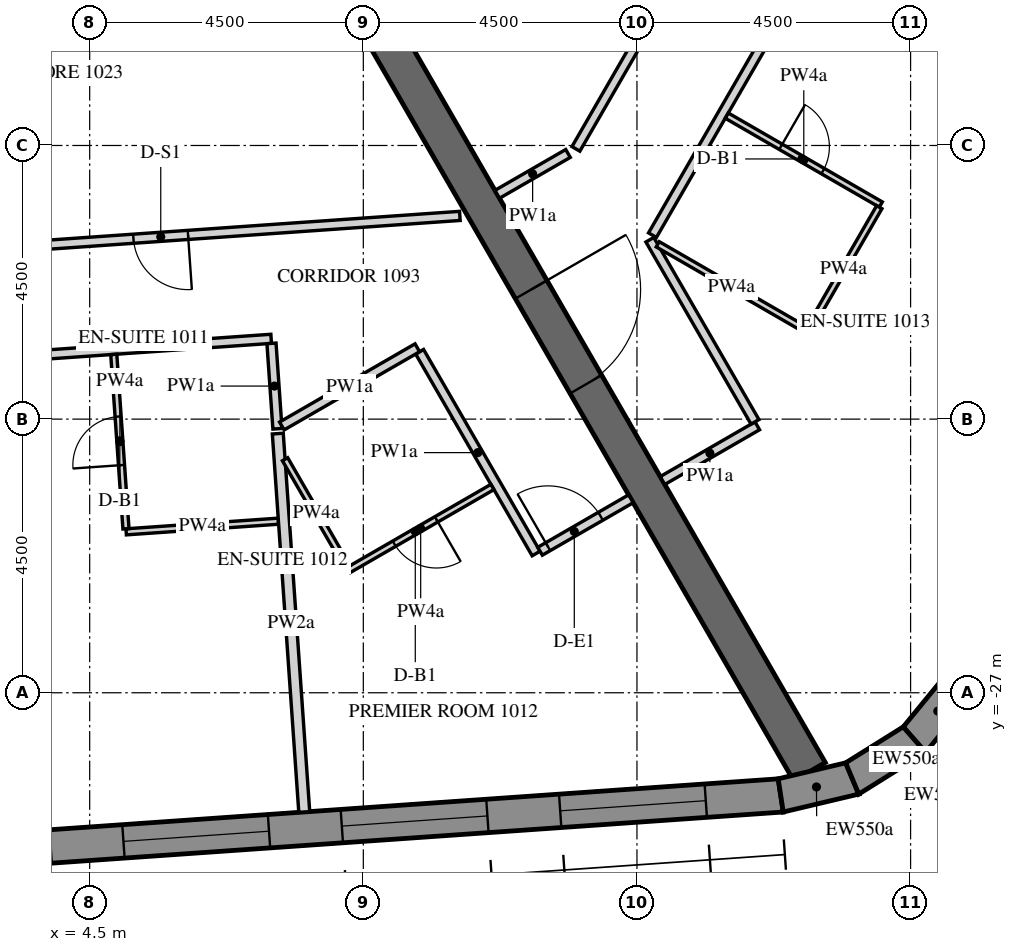
"""IFC4 building model, lengths in metres.
Left out: names, types, materials, properties, quantities, classifications, styles, units other than length and angle.
Written with IfcOpenShell. Run it as: python <this file> out.ifc"""

import sys

from ifc_helpers import new_model, si_unit, direction, frame, frame_2d, origin, place, context, subcontext, project, spatial, polyline, rectangle, outline, extrude, element, fill, save


model = new_model("IFC4")
c1 = context("Model", 3, precision=1e-05, world=origin(), true_north=direction((0.0, 1.0)))
c2 = subcontext(c1, "Body", "Model", "MODEL_VIEW")
j1 = project(units=[si_unit("LENGTHUNIT", "METRE"), si_unit("PLANEANGLEUNIT", "RADIAN")], contexts=[c1])
p1 = place(None, origin())
s1 = spatial("IfcSite", under=j1, at=p1, CompositionType="ELEMENT")
p2 = place(p1, origin())
s2 = spatial("IfcBuilding", under=s1, at=p2, CompositionType="ELEMENT")
p3 = place(p2, frame((0.0, 0.0, 142.8)))
s3 = spatial("IfcBuildingStorey", under=s2, at=p3, CompositionType="ELEMENT", Elevation=142.8)
p4 = place(p3, frame((-14.134, -30.786, -0.15), z_axis=(0.0, 0.0, 1.0), x_axis=(0.997564037441, 0.069756657061, 0.0)))
e1 = element("IfcWall", 1, at=p4, inside=s3, PredefinedType="SOLIDWALL", context=c2, shape_type="SweptSolid", body=[
    extrude(outline(polyline([(-0.026, -0.275), (30.094, -0.275), (30.049, 0.275), (0.026, 0.275), (-0.026, -0.275)])), origin(), (0.0, 0.0, 1.0), 3.75),
])
p5 = place(p4, frame((1.236, 0.0, 1.05)))
e2 = element("IfcOpeningElement", 2, at=p5, cuts=e1, PredefinedType="OPENING", context=c2, shape_type="SweptSolid", body=[
    extrude(rectangle(XDim=2.4, YDim=2.4, at=frame_2d((1.2, 1.2))), frame((0.0, 0.285, 0.0), z_axis=(0.0, -1.0, 0.0), x_axis=(1.0, 0.0, 0.0)), (0.0, 0.0, 1.0), 0.57),
])
p6 = place(p4, frame((4.835, 0.0, 1.05)))
e3 = element("IfcOpeningElement", 3, at=p6, cuts=e1, PredefinedType="OPENING", context=c2, shape_type="SweptSolid", body=[
    extrude(rectangle(XDim=2.4, YDim=2.4, at=frame_2d((1.2, 1.2))), frame((0.0, 0.285, 0.0), z_axis=(0.0, -1.0, 0.0), x_axis=(1.0, 0.0, 0.0)), (0.0, 0.0, 1.0), 0.57),
])
p7 = place(p4, frame((8.436, 0.0, 1.05)))
e4 = element("IfcOpeningElement", 4, at=p7, cuts=e1, PredefinedType="OPENING", context=c2, shape_type="SweptSolid", body=[
    extrude(rectangle(XDim=2.4, YDim=2.4, at=frame_2d((1.2, 1.2))), frame((0.0, 0.285, 0.0), z_axis=(0.0, -1.0, 0.0), x_axis=(1.0, 0.0, 0.0)), (0.0, 0.0, 1.0), 0.57),
])
p8 = place(p4, frame((12.035, 0.0, 1.05)))
e5 = element("IfcOpeningElement", 5, at=p8, cuts=e1, PredefinedType="OPENING", context=c2, shape_type="SweptSolid", body=[
    extrude(rectangle(XDim=2.4, YDim=2.4, at=frame_2d((1.2, 1.2))), frame((0.0, 0.285, 0.0), z_axis=(0.0, -1.0, 0.0), x_axis=(1.0, 0.0, 0.0)), (0.0, 0.0, 1.0), 0.57),
])
p9 = place(p4, frame((15.635, 0.0, 1.05)))
e6 = element("IfcOpeningElement", 6, at=p9, cuts=e1, PredefinedType="OPENING", context=c2, shape_type="SweptSolid", body=[
    extrude(rectangle(XDim=2.4, YDim=2.4, at=frame_2d((1.2, 1.2))), frame((0.0, 0.285, 0.0), z_axis=(0.0, -1.0, 0.0), x_axis=(1.0, 0.0, 0.0)), (0.0, 0.0, 1.0), 0.57),
])
p10 = place(p4, frame((19.236, 0.0, 1.05)))
e7 = element("IfcOpeningElement", 7, at=p10, cuts=e1, PredefinedType="OPENING", context=c2, shape_type="SweptSolid", body=[
    extrude(rectangle(XDim=2.4, YDim=2.4, at=frame_2d((1.2, 1.2))), frame((0.0, 0.285, 0.0), z_axis=(0.0, -1.0, 0.0), x_axis=(1.0, 0.0, 0.0)), (0.0, 0.0, 1.0), 0.57),
])
p11 = place(p4, frame((22.835, 0.0, 1.05)))
e8 = element("IfcOpeningElement", 8, at=p11, cuts=e1, PredefinedType="OPENING", context=c2, shape_type="SweptSolid", body=[
    extrude(rectangle(XDim=2.4, YDim=2.4, at=frame_2d((1.2, 1.2))), frame((0.0, 0.285, 0.0), z_axis=(0.0, -1.0, 0.0), x_axis=(1.0, 0.0, 0.0)), (0.0, 0.0, 1.0), 0.57),
])
p12 = place(p4, frame((26.436, 0.0, 1.05)))
e9 = element("IfcOpeningElement", 9, at=p12, cuts=e1, PredefinedType="OPENING", context=c2, shape_type="SweptSolid", body=[
    extrude(rectangle(XDim=2.4, YDim=2.4, at=frame_2d((1.2, 1.2))), frame((0.0, 0.285, 0.0), z_axis=(0.0, -1.0, 0.0), x_axis=(1.0, 0.0, 0.0)), (0.0, 0.0, 1.0), 0.57),
])
p13 = place(p3, frame((15.864, -28.688, -0.15), z_axis=(0.0, 0.0, 1.0), x_axis=(0.973063591128, 0.230536868247, 0.0)))
e10 = element("IfcWall", 10, at=p13, inside=s3, PredefinedType="SOLIDWALL", context=c2, shape_type="SweptSolid", body=[
    extrude(outline(polyline([(-0.022, -0.275), (1.253, -0.275), (1.163, 0.275), (0.022, 0.275), (-0.022, -0.275)])), origin(), (0.0, 0.0, 1.0), 3.75),
])
p14 = place(p3, frame((17.04, -28.41, -0.15), z_axis=(0.0, 0.0, 1.0), x_axis=(0.847952888306, 0.530071598195, 0.0)))
e11 = element("IfcWall", 11, at=p14, inside=s3, PredefinedType="SOLIDWALL", context=c2, shape_type="SweptSolid", body=[
    extrude(outline(polyline([(-0.045, -0.275), (1.253, -0.275), (1.163, 0.275), (0.045, 0.275), (-0.045, -0.275)])), origin(), (0.0, 0.0, 1.0), 3.75),
])
p15 = place(p3, frame((18.064, -27.769, -0.15), z_axis=(0.0, 0.0, 1.0), x_axis=(0.633842757806, 0.773461930787, 0.0)))
e12 = element("IfcWall", 12, at=p15, inside=s3, PredefinedType="SOLIDWALL", context=c2, shape_type="SweptSolid", body=[
    extrude(outline(polyline([(-0.045, -0.275), (1.231, -0.275), (1.186, 0.275), (0.045, 0.275), (-0.045, -0.275)])), origin(), (0.0, 0.0, 1.0), 3.75),
])
p16 = place(p3, frame((8.083, -14.0, -0.15), z_axis=(0.0, 0.0, 1.0), x_axis=(0.499997680643, -0.866026742862, 0.0)))
e13 = element("IfcWall", 13, at=p16, inside=s3, PredefinedType="SHEAR", context=c2, shape_type="SweptSolid", body=[
    extrude(rectangle(XDim=16.509, YDim=0.6, at=frame_2d((8.254, 0.0))), origin(), (0.0, 0.0, 1.0), 3.75),
])
p17 = place(p16, frame((7.354, 0.0, 0.15)))
e14 = element("IfcOpeningElement", 14, at=p17, cuts=e13, PredefinedType="OPENING", context=c2, shape_type="SweptSolid", body=[
    extrude(rectangle(XDim=1.8, YDim=2.4, at=frame_2d((0.9, 1.2))), frame((0.0, 0.31, 0.0), z_axis=(0.0, -1.0, 0.0), x_axis=(1.0, 0.0, 0.0)), (0.0, 0.0, 1.0), 0.62),
])
p18 = place(p3, frame((-11.902, -22.535, 0.0), z_axis=(0.0, 0.0, 1.0), x_axis=(0.997563830208, 0.069759620556, 0.0)))
e15 = element("IfcWall", 15, at=p18, inside=s3, PredefinedType="PARTITIONING", context=c2, shape_type="SweptSolid", body=[
    extrude(rectangle(XDim=19.434, YDim=0.15, at=frame_2d((9.717, 0.0))), origin(), (0.0, 0.0, 1.0), 2.838),
])
p19 = place(p18, frame((2.575, 0.0, 0.0)))
e16 = element("IfcOpeningElement", 16, at=p19, cuts=e15, PredefinedType="OPENING", context=c2, shape_type="SweptSolid", body=[
    extrude(rectangle(XDim=1.0, YDim=2.1, at=frame_2d((0.5, 1.05))), frame((0.0, 0.085, 0.0), z_axis=(0.0, -1.0, 0.0), x_axis=(1.0, 0.0, 0.0)), (0.0, 0.0, 1.0), 0.17),
])
p20 = place(p18, frame((12.234, 0.0, 0.0)))
e17 = element("IfcOpeningElement", 17, at=p20, cuts=e15, PredefinedType="OPENING", context=c2, shape_type="SweptSolid", body=[
    extrude(rectangle(XDim=1.0, YDim=2.1, at=frame_2d((0.5, 1.05))), frame((0.0, 0.085, 0.0), z_axis=(0.0, -1.0, 0.0), x_axis=(1.0, 0.0, 0.0)), (0.0, 0.0, 1.0), 0.17),
])
p21 = place(p3, frame((7.49, -21.254, 0.0), z_axis=(0.0, 0.0, 1.0), x_axis=(0.069718673592, -0.997566692784, 0.0)))
e18 = element("IfcWall", 18, at=p21, inside=s3, PredefinedType="PARTITIONING", context=c2, shape_type="SweptSolid", body=[
    extrude(rectangle(XDim=1.408, YDim=0.15, at=frame_2d((0.704, 0.0))), origin(), (0.0, 0.0, 1.0), 2.838),
])
p22 = place(p3, frame((9.926, -21.392, 0.0), z_axis=(0.0, 0.0, 1.0), x_axis=(0.500031306162, -0.866007328409, 0.0)))
e19 = element("IfcWall", 19, at=p22, inside=s3, PredefinedType="PARTITIONING", context=c2, shape_type="SweptSolid", body=[
    extrude(rectangle(XDim=3.832, YDim=0.15, at=frame_2d((1.916, 0.0))), origin(), (0.0, 0.0, 1.0), 2.838),
])
p23 = place(p3, frame((11.906, -24.673, 0.0), z_axis=(0.0, 0.0, 1.0), x_axis=(0.866013532718, 0.500020560727, 0.0)))
e20 = element("IfcWall", 20, at=p23, inside=s3, PredefinedType="PARTITIONING", context=c2, shape_type="SweptSolid", body=[
    extrude(rectangle(XDim=1.725, YDim=0.15, at=frame_2d((0.863, 0.0))), origin(), (0.0, 0.0, 1.0), 2.838),
])
p24 = place(p23, frame((0.15, 0.0, 0.0)))
e21 = element("IfcOpeningElement", 21, at=p24, cuts=e20, PredefinedType="OPENING", context=c2, shape_type="SweptSolid", body=[
    extrude(rectangle(XDim=1.0, YDim=2.1, at=frame_2d((0.5, 1.05))), frame((0.0, 0.085, 0.0), z_axis=(0.0, -1.0, 0.0), x_axis=(1.0, 0.0, 0.0)), (0.0, 0.0, 1.0), 0.17),
])
p25 = place(p3, frame((7.66, -22.613, 0.0), z_axis=(0.0, 0.0, 1.0), x_axis=(0.866003870164, 0.500037295471, 0.0)))
e22 = element("IfcWall", 22, at=p25, inside=s3, PredefinedType="PARTITIONING", context=c2, shape_type="SweptSolid", body=[
    extrude(rectangle(XDim=2.573, YDim=0.15, at=frame_2d((1.287, 0.0))), origin(), (0.0, 0.0, 1.0), 2.838),
])
p26 = place(p3, frame((10.587, -19.158, 0.0), z_axis=(0.0, 0.0, 1.0), x_axis=(-0.997565137136, -0.069740928955, 0.0)))
e23 = element("IfcWall", 23, at=p26, inside=s3, PredefinedType="PARTITIONING", context=c2, shape_type="SweptSolid", body=[
    extrude(rectangle(XDim=9.861, YDim=0.15, at=frame_2d((4.931, 0.0))), origin(), (0.0, 0.0, 1.0), 2.838),
])
p27 = place(p26, frame((4.481, 0.0, 0.0)))
e24 = element("IfcOpeningElement", 24, at=p27, cuts=e23, PredefinedType="OPENING", context=c2, shape_type="SweptSolid", body=[
    extrude(rectangle(XDim=0.9, YDim=2.1, at=frame_2d((0.45, 1.05))), frame((0.0, 0.085, 0.0), z_axis=(0.0, -1.0, 0.0), x_axis=(1.0, 0.0, 0.0)), (0.0, 0.0, 1.0), 0.17),
])
p28 = place(p3, frame((13.92, -23.51, 0.0), z_axis=(0.0, 0.0, 1.0), x_axis=(0.866047807691, 0.499961193289, 0.0)))
e25 = element("IfcWall", 25, at=p28, inside=s3, PredefinedType="PARTITIONING", context=c2, shape_type="SweptSolid", body=[
    extrude(rectangle(XDim=1.8, YDim=0.15, at=frame_2d((0.9, 0.0))), origin(), (0.0, 0.0, 1.0), 2.838),
])
p29 = place(p3, frame((15.441, -22.545, 0.0), z_axis=(0.0, 0.0, 1.0), x_axis=(-0.500003541824, 0.866023358902, 0.0)))
e26 = element("IfcWall", 26, at=p29, inside=s3, PredefinedType="PARTITIONING", context=c2, shape_type="SweptSolid", body=[
    extrude(rectangle(XDim=3.458, YDim=0.15, at=frame_2d((1.729, 0.0))), origin(), (0.0, 0.0, 1.0), 2.838),
])
p30 = place(p3, frame((13.755, -19.475, 0.0), z_axis=(0.0, 0.0, 1.0), x_axis=(0.50000013933, 0.866025323342, 0.0)))
e27 = element("IfcWall", 27, at=p30, inside=s3, PredefinedType="PARTITIONING", context=c2, shape_type="SweptSolid", body=[
    extrude(rectangle(XDim=23.517, YDim=0.15, at=frame_2d((11.758, 0.0))), origin(), (0.0, 0.0, 1.0), 2.838),
])
p31 = place(p30, frame((4.456, 0.0, 0.0)))
e28 = element("IfcOpeningElement", 28, at=p31, cuts=e27, PredefinedType="OPENING", context=c2, shape_type="SweptSolid", body=[
    extrude(rectangle(XDim=1.0, YDim=2.1, at=frame_2d((0.5, 1.05))), frame((0.0, 0.085, 0.0), z_axis=(0.0, -1.0, 0.0), x_axis=(1.0, 0.0, 0.0)), (0.0, 0.0, 1.0), 0.17),
])
p32 = place(p30, frame((13.699, 0.0, 0.0)))
e29 = element("IfcOpeningElement", 29, at=p32, cuts=e27, PredefinedType="OPENING", context=c2, shape_type="SweptSolid", body=[
    extrude(rectangle(XDim=1.0, YDim=2.1, at=frame_2d((0.5, 1.05))), frame((0.0, 0.085, 0.0), z_axis=(0.0, -1.0, 0.0), x_axis=(1.0, 0.0, 0.0)), (0.0, 0.0, 1.0), 0.17),
])
p33 = place(p30, frame((21.658, 0.0, 0.0)))
e30 = element("IfcOpeningElement", 30, at=p33, cuts=e27, PredefinedType="OPENING", context=c2, shape_type="SweptSolid", body=[
    extrude(rectangle(XDim=1.0, YDim=2.1, at=frame_2d((0.5, 1.05))), frame((0.0, 0.085, 0.0), z_axis=(0.0, -1.0, 0.0), x_axis=(1.0, 0.0, 0.0)), (0.0, 0.0, 1.0), 0.17),
])
p34 = place(p3, frame((16.643, -10.874, 0.0), z_axis=(0.0, 0.0, 1.0), x_axis=(-0.50000192383, -0.866024293058, 0.0)))
e31 = element("IfcWall", 31, at=p34, inside=s3, PredefinedType="PARTITIONING", context=c2, shape_type="SweptSolid", body=[
    extrude(rectangle(XDim=8.293, YDim=0.15, at=frame_2d((4.146, 0.0))), origin(), (0.0, 0.0, 1.0), 2.838),
])
p35 = place(p34, frame((3.697, 0.0, 0.0)))
e32 = element("IfcOpeningElement", 32, at=p35, cuts=e31, PredefinedType="OPENING", context=c2, shape_type="SweptSolid", body=[
    extrude(rectangle(XDim=0.9, YDim=2.1, at=frame_2d((0.45, 1.05))), frame((0.0, 0.085, 0.0), z_axis=(0.0, -1.0, 0.0), x_axis=(1.0, 0.0, 0.0)), (0.0, 0.0, 1.0), 0.17),
])
p36 = place(p3, frame((12.366, -18.131, 0.0), z_axis=(0.0, 0.0, 1.0), x_axis=(-0.866043397086, -0.499968833392, 0.0)))
e33 = element("IfcWall", 33, at=p36, inside=s3, PredefinedType="PARTITIONING", context=c2, shape_type="SweptSolid", body=[
    extrude(rectangle(XDim=1.344, YDim=0.15, at=frame_2d((0.672, 0.0))), origin(), (0.0, 0.0, 1.0), 2.838),
])
p37 = place(p3, frame((7.604, -24.178, 0.0), z_axis=(0.0, 0.0, 1.0), x_axis=(-0.997565196586, -0.069740078583, 0.0)))
e34 = element("IfcWall", 34, at=p37, inside=s3, PredefinedType="PARTITIONING", context=c2, shape_type="SweptSolid", body=[
    extrude(rectangle(XDim=2.51, YDim=0.1, at=frame_2d((1.255, 0.0))), origin(), (0.0, 0.0, 1.0), 2.838),
])
p38 = place(p3, frame((5.097, -24.304, 0.0), z_axis=(0.0, 0.0, 1.0), x_axis=(-0.069804620828, 0.99756068232, 0.0)))
e35 = element("IfcWall", 35, at=p38, inside=s3, PredefinedType="PARTITIONING", context=c2, shape_type="SweptSolid", body=[
    extrude(rectangle(XDim=2.875, YDim=0.1, at=frame_2d((1.438, 0.0))), origin(), (0.0, 0.0, 1.0), 2.838),
])
p39 = place(p38, frame((1.05, 0.0, 0.0)))
e36 = element("IfcOpeningElement", 36, at=p39, cuts=e35, PredefinedType="OPENING", context=c2, shape_type="SweptSolid", body=[
    extrude(rectangle(XDim=0.8, YDim=2.1, at=frame_2d((0.4, 1.05))), frame((0.0, 0.06, 0.0), z_axis=(0.0, -1.0, 0.0), x_axis=(1.0, 0.0, 0.0)), (0.0, 0.0, 1.0), 0.12),
])
p40 = place(p3, frame((8.029, -28.96, 0.0), z_axis=(0.0, 0.0, 1.0), x_axis=(-0.069750446855, 0.997564471683, 0.0)))
e37 = element("IfcWall", 37, at=p40, inside=s3, PredefinedType="PARTITIONING", context=c2, shape_type="SweptSolid", body=[
    extrude(rectangle(XDim=6.237, YDim=0.18, at=frame_2d((3.119, 0.0))), origin(), (0.0, 0.0, 1.0), 2.838),
])
p41 = place(p3, frame((11.123, -23.616, 0.0), z_axis=(0.0, 0.0, 1.0), x_axis=(-0.866034909742, -0.499983534837, 0.0)))
e38 = element("IfcWall", 38, at=p41, inside=s3, PredefinedType="PARTITIONING", context=c2, shape_type="SweptSolid", body=[
    extrude(rectangle(XDim=2.725, YDim=0.1, at=frame_2d((1.363, 0.0))), origin(), (0.0, 0.0, 1.0), 2.838),
])
p42 = place(p41, frame((1.065, 0.0, 0.0)))
e39 = element("IfcOpeningElement", 39, at=p42, cuts=e38, PredefinedType="OPENING", context=c2, shape_type="SweptSolid", body=[
    extrude(rectangle(XDim=0.8, YDim=2.1, at=frame_2d((0.4, 1.05))), frame((0.0, 0.06, 0.0), z_axis=(0.0, -1.0, 0.0), x_axis=(1.0, 0.0, 0.0)), (0.0, 0.0, 1.0), 0.12),
])
p43 = place(p3, frame((8.738, -24.935, 0.0), z_axis=(0.0, 0.0, 1.0), x_axis=(-0.500045446624, 0.865999163574, 0.0)))
e40 = element("IfcWall", 40, at=p43, inside=s3, PredefinedType="PARTITIONING", context=c2, shape_type="SweptSolid", body=[
    extrude(rectangle(XDim=2.05, YDim=0.1, at=frame_2d((1.025, 0.0))), origin(), (0.0, 0.0, 1.0), 2.838),
])
p44 = place(p3, frame((14.977, -17.509, 0.0), z_axis=(0.0, 0.0, 1.0), x_axis=(0.866046596414, -0.499963291492, 0.0)))
e41 = element("IfcWall", 41, at=p44, inside=s3, PredefinedType="PARTITIONING", context=c2, shape_type="SweptSolid", body=[
    extrude(rectangle(XDim=2.925, YDim=0.1, at=frame_2d((1.462, 0.0))), origin(), (0.0, 0.0, 1.0), 2.838),
])
p45 = place(p44, frame((1.025, 0.0, 0.0)))
e42 = element("IfcOpeningElement", 42, at=p45, cuts=e41, PredefinedType="OPENING", context=c2, shape_type="SweptSolid", body=[
    extrude(rectangle(XDim=0.8, YDim=2.1, at=frame_2d((0.4, 1.05))), frame((0.0, 0.06, 0.0), z_axis=(0.0, -1.0, 0.0), x_axis=(1.0, 0.0, 0.0)), (0.0, 0.0, 1.0), 0.12),
])
p46 = place(p3, frame((17.485, -19.015, 0.0), z_axis=(0.0, 0.0, 1.0), x_axis=(-0.500016218704, -0.866016039709, 0.0)))
e43 = element("IfcWall", 43, at=p46, inside=s3, PredefinedType="PARTITIONING", context=c2, shape_type="SweptSolid", body=[
    extrude(rectangle(XDim=2.35, YDim=0.1, at=frame_2d((1.175, 0.0))), origin(), (0.0, 0.0, 1.0), 2.838),
])
p47 = place(p3, frame((16.267, -21.025, 0.0), z_axis=(0.0, 0.0, 1.0), x_axis=(-0.866034573852, 0.49998411664, 0.0)))
e44 = element("IfcWall", 44, at=p47, inside=s3, PredefinedType="PARTITIONING", context=c2, shape_type="SweptSolid", body=[
    extrude(rectangle(XDim=2.8, YDim=0.1, at=frame_2d((1.4, 0.0))), origin(), (0.0, 0.0, 1.0), 2.838),
])
p48 = place(p3, frame((24.31, -16.794, 0.0), z_axis=(0.0, 0.0, 1.0), x_axis=(-0.866027174938, 0.499996932259, 0.0)))
e45 = element("IfcWall", 45, at=p48, inside=s3, PredefinedType="PARTITIONING", context=c2, shape_type="SweptSolid", body=[
    extrude(rectangle(XDim=7.725, YDim=0.18, at=frame_2d((3.863, 0.0))), origin(), (0.0, 0.0, 1.0), 2.838),
])
p49 = place(p10, frame((0.0, 0.205, 0.0)))
e46 = element("IfcWindow", 46, at=p49, inside=s3, PartitioningType="DOUBLE_PANEL_VERTICAL", PredefinedType="WINDOW", context=c2, shape_type="SweptSolid", body=[
    extrude(rectangle(XDim=2.4, YDim=2.4, at=frame_2d((1.2, 1.2))), frame((0.0, 0.03, 0.0), z_axis=(0.0, -1.0, 0.0), x_axis=(1.0, 0.0, 0.0)), (0.0, 0.0, 1.0), 0.06),
])
fill(e7, e46)
p50 = place(p11, frame((0.0, 0.205, 0.0)))
e47 = element("IfcWindow", 47, at=p50, inside=s3, PartitioningType="DOUBLE_PANEL_VERTICAL", PredefinedType="WINDOW", context=c2, shape_type="SweptSolid", body=[
    extrude(rectangle(XDim=2.4, YDim=2.4, at=frame_2d((1.2, 1.2))), frame((0.0, 0.03, 0.0), z_axis=(0.0, -1.0, 0.0), x_axis=(1.0, 0.0, 0.0)), (0.0, 0.0, 1.0), 0.06),
])
fill(e8, e47)
p51 = place(p12, frame((0.0, 0.205, 0.0)))
e48 = element("IfcWindow", 48, at=p51, inside=s3, PartitioningType="DOUBLE_PANEL_VERTICAL", PredefinedType="WINDOW", context=c2, shape_type="SweptSolid", body=[
    extrude(rectangle(XDim=2.4, YDim=2.4, at=frame_2d((1.2, 1.2))), frame((0.0, 0.03, 0.0), z_axis=(0.0, -1.0, 0.0), x_axis=(1.0, 0.0, 0.0)), (0.0, 0.0, 1.0), 0.06),
])
fill(e9, e48)
p52 = place(p17, origin())
e49 = element("IfcDoor", 49, at=p52, inside=s3, OperationType="DOUBLE_DOOR_SINGLE_SWING", PredefinedType="DOOR", context=c2, shape_type="SweptSolid", body=[
    extrude(rectangle(XDim=1.8, YDim=2.4, at=frame_2d((0.9, 1.2))), frame((0.0, 0.025, 0.0), z_axis=(0.0, -1.0, 0.0), x_axis=(1.0, 0.0, 0.0)), (0.0, 0.0, 1.0), 0.05),
])
fill(e14, e49)
p53 = place(p39, origin())
e50 = element("IfcDoor", 50, at=p53, inside=s3, OperationType="SINGLE_SWING_RIGHT", PredefinedType="DOOR", context=c2, shape_type="SweptSolid", body=[
    extrude(rectangle(XDim=0.8, YDim=2.1, at=frame_2d((0.4, 1.05))), frame((0.0, 0.025, 0.0), z_axis=(0.0, -1.0, 0.0), x_axis=(1.0, 0.0, 0.0)), (0.0, 0.0, 1.0), 0.05),
])
fill(e36, e50)
p54 = place(p24, origin())
e51 = element("IfcDoor", 51, at=p54, inside=s3, OperationType="SINGLE_SWING_RIGHT", PredefinedType="DOOR", context=c2, shape_type="SweptSolid", body=[
    extrude(rectangle(XDim=1.0, YDim=2.1, at=frame_2d((0.5, 1.05))), frame((0.0, 0.025, 0.0), z_axis=(0.0, -1.0, 0.0), x_axis=(1.0, 0.0, 0.0)), (0.0, 0.0, 1.0), 0.05),
])
fill(e21, e51)
p55 = place(p42, origin())
e52 = element("IfcDoor", 52, at=p55, inside=s3, OperationType="SINGLE_SWING_LEFT", PredefinedType="DOOR", context=c2, shape_type="SweptSolid", body=[
    extrude(rectangle(XDim=0.8, YDim=2.1, at=frame_2d((0.4, 1.05))), frame((0.0, 0.025, 0.0), z_axis=(0.0, -1.0, 0.0), x_axis=(1.0, 0.0, 0.0)), (0.0, 0.0, 1.0), 0.05),
])
fill(e39, e52)
p56 = place(p45, origin())
e53 = element("IfcDoor", 53, at=p56, inside=s3, OperationType="SINGLE_SWING_RIGHT", PredefinedType="DOOR", context=c2, shape_type="SweptSolid", body=[
    extrude(rectangle(XDim=0.8, YDim=2.1, at=frame_2d((0.4, 1.05))), frame((0.0, 0.025, 0.0), z_axis=(0.0, -1.0, 0.0), x_axis=(1.0, 0.0, 0.0)), (0.0, 0.0, 1.0), 0.05),
])
fill(e42, e53)
p57 = place(p27, origin())
e54 = element("IfcDoor", 54, at=p57, inside=s3, OperationType="SINGLE_SWING_RIGHT", PredefinedType="DOOR", context=c2, shape_type="SweptSolid", body=[
    extrude(rectangle(XDim=0.9, YDim=2.1, at=frame_2d((0.45, 1.05))), frame((0.0, 0.025, 0.0), z_axis=(0.0, -1.0, 0.0), x_axis=(1.0, 0.0, 0.0)), (0.0, 0.0, 1.0), 0.05),
])
fill(e24, e54)
save(model, sys.argv[1])
